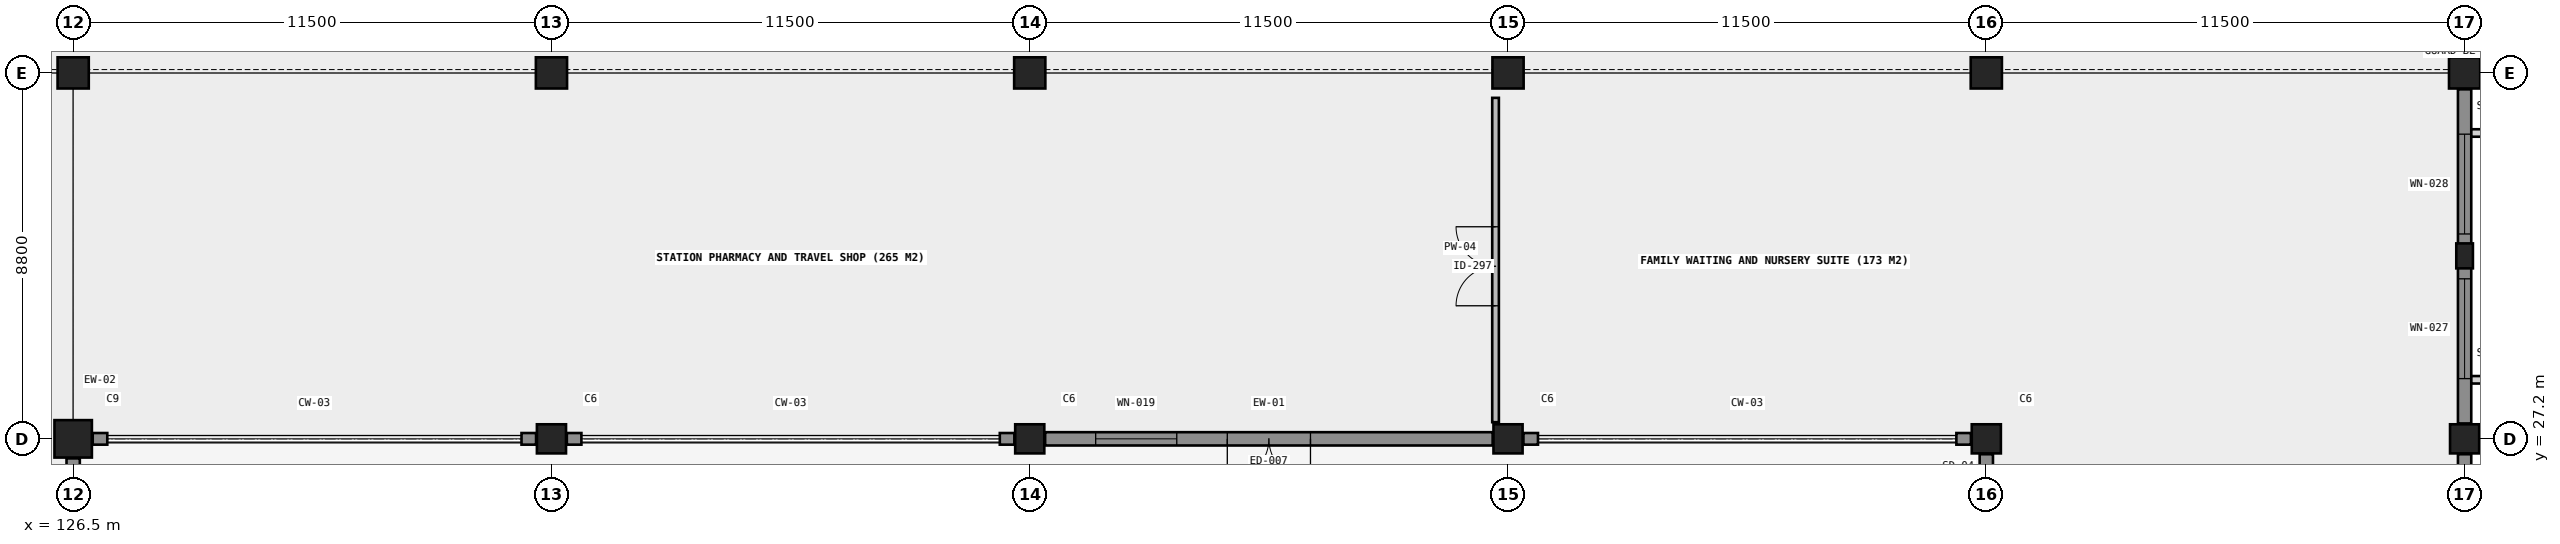
"""IFC4 building model, lengths in metres.
Left out: names, types, materials, properties, quantities, classifications, styles, units other than length and angle.
Written with IfcOpenShell. Run it as: python <this file> out.ifc"""

import sys

from ifc_helpers import new_model, si_unit, direction, frame, frame_2d, origin, origin_2d, place, context, subcontext, project, spatial, rectangle, circle, extrude, element, fill, save


model = new_model("IFC4")
c1 = context("Model", 3, precision=1e-05, world=origin(), true_north=direction((0.0, 1.0)))
c2 = subcontext(c1, "Body", "Model", "MODEL_VIEW")
j1 = project(units=[si_unit("LENGTHUNIT", "METRE"), si_unit("PLANEANGLEUNIT", "RADIAN")], contexts=[c1])
p1 = place(None, origin())
s1 = spatial("IfcSite", under=j1, at=p1, CompositionType="ELEMENT")
p2 = place(p1, origin())
s2 = spatial("IfcBuilding", under=s1, at=p2, CompositionType="ELEMENT")
p3 = place(p2, origin())
s3 = spatial("IfcBuildingStorey", under=s2, at=p3, CompositionType="ELEMENT", Elevation=0.0)
p4 = place(p3, frame((126.5, 27.2, 0.0), z_axis=(0.0, 0.0, 1.0), x_axis=(1.0, 0.0, 0.0)))
e1 = element("IfcColumn", 1, at=p4, inside=s3, PredefinedType="COLUMN", context=c2, shape_type="SweptSolid", body=[
    extrude(circle(Radius=0.45, at=origin_2d()), origin(), (0.0, 0.0, 1.0), 4.2),
])
p5 = place(p3, frame((126.5, 36.0, 0.0), z_axis=(0.0, 0.0, 1.0), x_axis=(1.0, 0.0, 0.0)))
e2 = element("IfcColumn", 2, at=p5, inside=s3, PredefinedType="COLUMN", context=c2, shape_type="SweptSolid", body=[
    extrude(rectangle(XDim=0.75, YDim=0.75, at=origin_2d()), origin(), (0.0, 0.0, 1.0), 4.2),
])
p6 = place(p3, frame((138.0, 27.2, 0.0), z_axis=(0.0, 0.0, 1.0), x_axis=(1.0, 0.0, 0.0)))
e3 = element("IfcColumn", 3, at=p6, inside=s3, PredefinedType="COLUMN", context=c2, shape_type="SweptSolid", body=[
    extrude(rectangle(XDim=0.7, YDim=0.7, at=origin_2d()), origin(), (0.0, 0.0, 1.0), 4.2),
])
p7 = place(p3, frame((138.0, 36.0, 0.0), z_axis=(0.0, 0.0, 1.0), x_axis=(1.0, 0.0, 0.0)))
e4 = element("IfcColumn", 4, at=p7, inside=s3, PredefinedType="COLUMN", context=c2, shape_type="SweptSolid", body=[
    extrude(rectangle(XDim=0.75, YDim=0.75, at=origin_2d()), origin(), (0.0, 0.0, 1.0), 4.2),
])
p8 = place(p3, frame((149.5, 27.2, 0.0), z_axis=(0.0, 0.0, 1.0), x_axis=(1.0, 0.0, 0.0)))
e5 = element("IfcColumn", 5, at=p8, inside=s3, PredefinedType="COLUMN", context=c2, shape_type="SweptSolid", body=[
    extrude(rectangle(XDim=0.7, YDim=0.7, at=origin_2d()), origin(), (0.0, 0.0, 1.0), 4.2),
])
p9 = place(p3, frame((149.5, 36.0, 0.0), z_axis=(0.0, 0.0, 1.0), x_axis=(1.0, 0.0, 0.0)))
e6 = element("IfcColumn", 6, at=p9, inside=s3, PredefinedType="COLUMN", context=c2, shape_type="SweptSolid", body=[
    extrude(rectangle(XDim=0.75, YDim=0.75, at=origin_2d()), origin(), (0.0, 0.0, 1.0), 4.2),
])
p10 = place(p3, frame((161.0, 27.2, 0.0), z_axis=(0.0, 0.0, 1.0), x_axis=(1.0, 0.0, 0.0)))
e7 = element("IfcColumn", 7, at=p10, inside=s3, PredefinedType="COLUMN", context=c2, shape_type="SweptSolid", body=[
    extrude(rectangle(XDim=0.7, YDim=0.7, at=origin_2d()), origin(), (0.0, 0.0, 1.0), 4.2),
])
p11 = place(p3, frame((161.0, 36.0, 0.0), z_axis=(0.0, 0.0, 1.0), x_axis=(1.0, 0.0, 0.0)))
e8 = element("IfcColumn", 8, at=p11, inside=s3, PredefinedType="COLUMN", context=c2, shape_type="SweptSolid", body=[
    extrude(rectangle(XDim=0.75, YDim=0.75, at=origin_2d()), origin(), (0.0, 0.0, 1.0), 4.2),
])
p12 = place(p3, frame((172.5, 27.2, 0.0), z_axis=(0.0, 0.0, 1.0), x_axis=(1.0, 0.0, 0.0)))
e9 = element("IfcColumn", 9, at=p12, inside=s3, PredefinedType="COLUMN", context=c2, shape_type="SweptSolid", body=[
    extrude(rectangle(XDim=0.7, YDim=0.7, at=origin_2d()), origin(), (0.0, 0.0, 1.0), 4.2),
])
p13 = place(p3, frame((172.5, 36.0, 0.0), z_axis=(0.0, 0.0, 1.0), x_axis=(1.0, 0.0, 0.0)))
e10 = element("IfcColumn", 10, at=p13, inside=s3, PredefinedType="COLUMN", context=c2, shape_type="SweptSolid", body=[
    extrude(rectangle(XDim=0.75, YDim=0.75, at=origin_2d()), origin(), (0.0, 0.0, 1.0), 4.2),
])
p14 = place(p3, frame((184.0, 27.2, 0.0), z_axis=(0.0, 0.0, 1.0), x_axis=(1.0, 0.0, 0.0)))
e11 = element("IfcColumn", 11, at=p14, inside=s3, PredefinedType="COLUMN", context=c2, shape_type="SweptSolid", body=[
    extrude(rectangle(XDim=0.7, YDim=0.7, at=origin_2d()), origin(), (0.0, 0.0, 1.0), 4.2),
])
p15 = place(p3, frame((184.0, 36.0, 0.0), z_axis=(0.0, 0.0, 1.0), x_axis=(1.0, 0.0, 0.0)))
e12 = element("IfcColumn", 12, at=p15, inside=s3, PredefinedType="COLUMN", context=c2, shape_type="SweptSolid", body=[
    extrude(rectangle(XDim=0.75, YDim=0.75, at=origin_2d()), origin(), (0.0, 0.0, 1.0), 4.2),
])
p16 = place(p3, frame((184.0, 31.6, 0.0), z_axis=(0.0, 0.0, 1.0), x_axis=(1.0, 0.0, 0.0)))
e13 = element("IfcColumn", 13, at=p16, inside=s3, PredefinedType="PILASTER", context=c2, shape_type="SweptSolid", body=[
    extrude(rectangle(XDim=0.4, YDim=0.6, at=origin_2d()), origin(), (0.0, 0.0, 1.0), 4.2),
])
p17 = place(p3, frame((126.5, 18.07, 0.0), z_axis=(0.0, 0.0, 1.0), x_axis=(0.0, 1.0, 0.0)))
e14 = element("IfcWall", 14, at=p17, inside=s3, PredefinedType="SOLIDWALL", context=c2, shape_type="SweptSolid", body=[
    extrude(rectangle(XDim=8.66, YDim=0.32, at=frame_2d((4.33, 0.0))), origin(), (0.0, 0.0, 1.0), 3.0),
])
p18 = place(p17, frame((1.287, 0.0, 0.84)))
e15 = element("IfcOpeningElement", 15, at=p18, cuts=e14, PredefinedType="OPENING", context=c2, shape_type="SweptSolid", body=[
    extrude(rectangle(XDim=2.4, YDim=2.1, at=frame_2d((1.2, 1.05))), frame((0.0, 0.17, 0.0), z_axis=(0.0, -1.0, 0.0), x_axis=(1.0, 0.0, 0.0)), (0.0, 0.0, 1.0), 0.34),
])
p19 = place(p17, frame((4.973, 0.0, 0.84)))
e16 = element("IfcOpeningElement", 16, at=p19, cuts=e14, PredefinedType="OPENING", context=c2, shape_type="SweptSolid", body=[
    extrude(rectangle(XDim=2.4, YDim=2.1, at=frame_2d((1.2, 1.05))), frame((0.0, 0.17, 0.0), z_axis=(0.0, -1.0, 0.0), x_axis=(1.0, 0.0, 0.0)), (0.0, 0.0, 1.0), 0.34),
])
p20 = place(p3, frame((126.97, 27.2, 0.0), z_axis=(0.0, 0.0, 1.0), x_axis=(1.0, 0.0, 0.0)))
e17 = element("IfcWall", 17, at=p20, inside=s3, PredefinedType="SOLIDWALL", context=c2, shape_type="SweptSolid", body=[
    extrude(rectangle(XDim=0.35, YDim=0.28, at=frame_2d((0.175, 0.0))), origin(), (0.0, 0.0, 1.0), 3.88),
])
for number, where, z_axis, x_axis in (
    (18, (137.28, 27.2, 0.0), (0.0, 0.0, 1.0), (1.0, 0.0, 0.0)),
    (19, (138.37, 27.2, 0.0), (0.0, 0.0, 1.0), (1.0, 0.0, 0.0)),
    (20, (148.78, 27.2, 0.0), (0.0, 0.0, 1.0), (1.0, 0.0, 0.0)),
):
    element("IfcWall", number, at=place(p3, frame(where, z_axis=z_axis, x_axis=x_axis)), inside=s3, PredefinedType="SOLIDWALL", context=c2, shape_type="SweptSolid", body=[
        extrude(rectangle(XDim=0.35, YDim=0.28, at=frame_2d((0.175, 0.0))), origin(), (0.0, 0.0, 1.0), 3.88),
    ])
p21 = place(p3, frame((149.87, 27.2, 0.0), z_axis=(0.0, 0.0, 1.0), x_axis=(1.0, 0.0, 0.0)))
e21 = element("IfcWall", 21, at=p21, inside=s3, PredefinedType="SOLIDWALL", context=c2, shape_type="SweptSolid", body=[
    extrude(rectangle(XDim=10.76, YDim=0.32, at=frame_2d((5.38, 0.0))), origin(), (0.0, 0.0, 1.0), 3.0),
])
p22 = place(p21, frame((4.38, 0.0, 0.0)))
e22 = element("IfcOpeningElement", 22, at=p22, cuts=e21, PredefinedType="OPENING", context=c2, shape_type="SweptSolid", body=[
    extrude(rectangle(XDim=2.0, YDim=2.4, at=frame_2d((1.0, 1.2))), frame((0.0, 0.17, 0.0), z_axis=(0.0, -1.0, 0.0), x_axis=(1.0, 0.0, 0.0)), (0.0, 0.0, 1.0), 0.34),
])
p23 = place(p21, frame((1.215, 0.0, 0.78)))
e23 = element("IfcOpeningElement", 23, at=p23, cuts=e21, PredefinedType="OPENING", context=c2, shape_type="SweptSolid", body=[
    extrude(rectangle(XDim=1.95, YDim=1.75, at=frame_2d((0.975, 0.875))), frame((0.0, 0.17, 0.0), z_axis=(0.0, -1.0, 0.0), x_axis=(1.0, 0.0, 0.0)), (0.0, 0.0, 1.0), 0.34),
])
for number, where, z_axis, x_axis in (
    (24, (161.37, 27.2, 0.0), (0.0, 0.0, 1.0), (1.0, 0.0, 0.0)),
    (25, (171.78, 27.2, 0.0), (0.0, 0.0, 1.0), (1.0, 0.0, 0.0)),
):
    element("IfcWall", number, at=place(p3, frame(where, z_axis=z_axis, x_axis=x_axis)), inside=s3, PredefinedType="SOLIDWALL", context=c2, shape_type="SweptSolid", body=[
        extrude(rectangle(XDim=0.35, YDim=0.28, at=frame_2d((0.175, 0.0))), origin(), (0.0, 0.0, 1.0), 3.88),
    ])
p24 = place(p3, frame((172.5, 17.97, 0.0), z_axis=(0.0, 0.0, 1.0), x_axis=(0.0, 1.0, 0.0)))
e26 = element("IfcWall", 26, at=p24, inside=s3, PredefinedType="SOLIDWALL", context=c2, shape_type="SweptSolid", body=[
    extrude(rectangle(XDim=8.86, YDim=0.32, at=frame_2d((4.43, 0.0))), origin(), (0.0, 0.0, 1.0), 3.0),
])
p25 = place(p24, frame((1.82, 0.0, 0.85)))
e27 = element("IfcOpeningElement", 27, at=p25, cuts=e26, PredefinedType="OPENING", context=c2, shape_type="SweptSolid", body=[
    extrude(rectangle(XDim=1.7, YDim=1.5, at=frame_2d((0.85, 0.75))), frame((0.0, 0.17, 0.0), z_axis=(0.0, -1.0, 0.0), x_axis=(1.0, 0.0, 0.0)), (0.0, 0.0, 1.0), 0.34),
])
p26 = place(p24, frame((5.34, 0.0, 0.85)))
e28 = element("IfcOpeningElement", 28, at=p26, cuts=e26, PredefinedType="OPENING", context=c2, shape_type="SweptSolid", body=[
    extrude(rectangle(XDim=1.7, YDim=1.5, at=frame_2d((0.85, 0.75))), frame((0.0, 0.17, 0.0), z_axis=(0.0, -1.0, 0.0), x_axis=(1.0, 0.0, 0.0)), (0.0, 0.0, 1.0), 0.34),
])
p27 = place(p3, frame((184.0, 17.97, 0.0), z_axis=(0.0, 0.0, 1.0), x_axis=(0.0, 1.0, 0.0)))
e29 = element("IfcWall", 29, at=p27, inside=s3, PredefinedType="SOLIDWALL", context=c2, shape_type="SweptSolid", body=[
    extrude(rectangle(XDim=8.86, YDim=0.32, at=frame_2d((4.43, 0.0))), origin(), (0.0, 0.0, 1.0), 3.2),
])
p28 = place(p27, frame((0.854, 0.0, 0.0)))
e30 = element("IfcOpeningElement", 30, at=p28, cuts=e29, PredefinedType="OPENING", context=c2, shape_type="SweptSolid", body=[
    extrude(rectangle(XDim=2.9, YDim=2.95, at=frame_2d((1.45, 1.475))), frame((0.0, 0.17, 0.0), z_axis=(0.0, -1.0, 0.0), x_axis=(1.0, 0.0, 0.0)), (0.0, 0.0, 1.0), 0.34),
])
p29 = place(p3, frame((184.0, 27.57, 0.0), z_axis=(0.0, 0.0, 1.0), x_axis=(0.0, 1.0, 0.0)))
e31 = element("IfcWall", 31, at=p29, inside=s3, PredefinedType="SOLIDWALL", context=c2, shape_type="SweptSolid", body=[
    extrude(rectangle(XDim=8.035, YDim=0.32, at=frame_2d((4.018, 0.0))), origin(), (0.0, 0.0, 1.0), 3.2),
])
p30 = place(p29, frame((1.078, 0.0, 0.84)))
e32 = element("IfcOpeningElement", 32, at=p30, cuts=e31, PredefinedType="OPENING", context=c2, shape_type="SweptSolid", body=[
    extrude(rectangle(XDim=2.4, YDim=2.1, at=frame_2d((1.2, 1.05))), frame((0.0, 0.17, 0.0), z_axis=(0.0, -1.0, 0.0), x_axis=(1.0, 0.0, 0.0)), (0.0, 0.0, 1.0), 0.34),
])
p31 = place(p29, frame((4.557, 0.0, 0.84)))
e33 = element("IfcOpeningElement", 33, at=p31, cuts=e31, PredefinedType="OPENING", context=c2, shape_type="SweptSolid", body=[
    extrude(rectangle(XDim=2.4, YDim=2.1, at=frame_2d((1.2, 1.05))), frame((0.0, 0.17, 0.0), z_axis=(0.0, -1.0, 0.0), x_axis=(1.0, 0.0, 0.0)), (0.0, 0.0, 1.0), 0.34),
])
p32 = place(p3, frame((160.7, 27.6, 0.0), z_axis=(0.0, 0.0, 1.0), x_axis=(0.0, 1.0, 0.0)))
e34 = element("IfcWall", 34, at=p32, inside=s3, PredefinedType="PARTITIONING", context=c2, shape_type="SweptSolid", body=[
    extrude(rectangle(XDim=7.8, YDim=0.16, at=frame_2d((3.9, 0.0))), origin(), (0.0, 0.0, 1.0), 3.0),
])
p33 = place(p32, frame((2.8, 0.0, 0.0)))
e35 = element("IfcOpeningElement", 35, at=p33, cuts=e34, PredefinedType="OPENING", context=c2, shape_type="SweptSolid", body=[
    extrude(rectangle(XDim=1.9, YDim=2.35, at=frame_2d((0.95, 1.175))), frame((0.0, 0.09, 0.0), z_axis=(0.0, -1.0, 0.0), x_axis=(1.0, 0.0, 0.0)), (0.0, 0.0, 1.0), 0.18),
])
p34 = place(p22, frame((1.0, 0.0, 0.0), z_axis=(0.0, 0.0, 1.0), x_axis=(-1.0, 0.0, 0.0)))
e36 = element("IfcDoor", 36, at=p34, inside=s3, OperationType="DOUBLE_DOOR_SINGLE_SWING", PredefinedType="DOOR", context=c2, shape_type="SweptSolid", body=[
    extrude(rectangle(XDim=2.0, YDim=2.4, at=frame_2d((0.0, 1.2))), frame((0.0, 0.025, 0.0), z_axis=(0.0, -1.0, 0.0), x_axis=(1.0, 0.0, 0.0)), (0.0, 0.0, 1.0), 0.05),
])
fill(e22, e36)
p35 = place(p23, origin())
e37 = element("IfcWindow", 37, at=p35, inside=s3, PartitioningType="SINGLE_PANEL", PredefinedType="WINDOW", context=c2, shape_type="SweptSolid", body=[
    extrude(rectangle(XDim=1.95, YDim=1.75, at=frame_2d((0.975, 0.875))), frame((0.0, 0.03, 0.0), z_axis=(0.0, -1.0, 0.0), x_axis=(1.0, 0.0, 0.0)), (0.0, 0.0, 1.0), 0.06),
])
fill(e23, e37)
p36 = place(p30, origin())
e38 = element("IfcWindow", 38, at=p36, inside=s3, PartitioningType="SINGLE_PANEL", PredefinedType="WINDOW", context=c2, shape_type="SweptSolid", body=[
    extrude(rectangle(XDim=2.4, YDim=2.1, at=frame_2d((1.2, 1.05))), frame((0.0, 0.03, 0.0), z_axis=(0.0, -1.0, 0.0), x_axis=(1.0, 0.0, 0.0)), (0.0, 0.0, 1.0), 0.06),
])
fill(e32, e38)
p37 = place(p31, origin())
e39 = element("IfcWindow", 39, at=p37, inside=s3, PartitioningType="SINGLE_PANEL", PredefinedType="WINDOW", context=c2, shape_type="SweptSolid", body=[
    extrude(rectangle(XDim=2.4, YDim=2.1, at=frame_2d((1.2, 1.05))), frame((0.0, 0.03, 0.0), z_axis=(0.0, -1.0, 0.0), x_axis=(1.0, 0.0, 0.0)), (0.0, 0.0, 1.0), 0.06),
])
fill(e33, e39)
p38 = place(p33, origin())
e40 = element("IfcDoor", 40, at=p38, inside=s3, OperationType="DOUBLE_DOOR_SINGLE_SWING", PredefinedType="DOOR", context=c2, shape_type="SweptSolid", body=[
    extrude(rectangle(XDim=1.9, YDim=2.35, at=frame_2d((0.95, 1.175))), frame((0.0, 0.025, 0.0), z_axis=(0.0, -1.0, 0.0), x_axis=(1.0, 0.0, 0.0)), (0.0, 0.0, 1.0), 0.05),
])
fill(e35, e40)
save(model, sys.argv[1])
